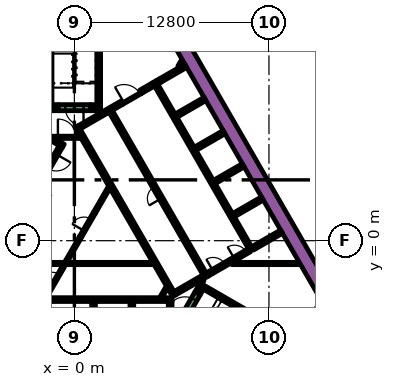
"""IFC4 building model, lengths in metres.
Left out: names, types, materials, properties, quantities, classifications, styles, units other than length and angle.
Written with IfcOpenShell. Run it as: python <this file> out.ifc"""

import sys

from ifc_helpers import new_model, si_unit, direction, frame, frame_2d, origin, origin_2d, place, context, subcontext, project, spatial, polyline, rectangle, outline, extrude, element, fill, save


model = new_model("IFC4")
c1 = context("Model", 3, precision=1e-05, world=origin(), true_north=direction((0.0, 1.0)))
c2 = subcontext(c1, "Body", "Model", "MODEL_VIEW")
j1 = project(units=[si_unit("LENGTHUNIT", "METRE"), si_unit("PLANEANGLEUNIT", "RADIAN")], contexts=[c1])
p1 = place(None, origin())
s1 = spatial("IfcSite", under=j1, at=p1, CompositionType="ELEMENT")
p2 = place(p1, origin())
s2 = spatial("IfcBuilding", under=s1, at=p2, CompositionType="ELEMENT")
p3 = place(p2, origin())
s3 = spatial("IfcBuildingStorey", under=s2, at=p3, CompositionType="ELEMENT", Elevation=0.0)
p4 = place(p3, frame((19.355, 12.329, 2.1), z_axis=(-0.200269190983, 0.336813845705, 0.920026458578), x_axis=(-0.859534207637, -0.511078218966, 0.0)))
e1 = element("IfcColumn", 1, at=p4, inside=s3, PredefinedType="COLUMN", context=c2, shape_type="SweptSolid", body=[
    extrude(rectangle(XDim=1.8, YDim=1.6, at=origin_2d()), origin(), (0.0, 0.0, 1.0), 17.608),
])
p5 = place(p2, frame((0.0, 0.0, 16.2)))
s4 = spatial("IfcBuildingStorey", under=s2, at=p5, CompositionType="ELEMENT", Elevation=16.2)
p6 = place(p5, frame((6.776, 13.364, 0.0), z_axis=(0.0, 0.0, 1.0), x_axis=(0.500004177138, -0.8660229921, 0.0)))
e2 = element("IfcWall", 2, at=p6, inside=s4, PredefinedType="SOLIDWALL", context=c2, shape_type="SweptSolid", body=[
    extrude(rectangle(XDim=20.204, YDim=0.9, at=frame_2d((10.102, 0.0))), origin(), (0.0, 0.0, 1.0), 5.4),
])
p7 = place(p5, frame((11.695, -12.644, 0.0), z_axis=(0.0, 0.0, 1.0), x_axis=(0.500010229568, 0.86601949766, 0.0)))
e3 = element("IfcWall", 3, at=p7, inside=s4, PredefinedType="SOLIDWALL", context=c2, shape_type="SweptSolid", body=[
    extrude(rectangle(XDim=9.326, YDim=0.9, at=frame_2d((4.663, 0.0))), origin(), (0.0, 0.0, 1.0), 5.4),
])
p8 = place(p5, frame((8.334, -2.964, 0.0), z_axis=(0.0, 0.0, 1.0), x_axis=(0.866016039709, -0.500016218704, 0.0)))
e4 = element("IfcWall", 4, at=p8, inside=s4, PredefinedType="SOLIDWALL", context=c2, shape_type="SweptSolid", body=[
    extrude(rectangle(XDim=7.05, YDim=0.25, at=frame_2d((3.525, 0.0))), origin(), (0.0, 0.0, 1.0), 5.4),
])
p9 = place(p5, frame((8.168, -3.503, 0.0), z_axis=(0.0, 0.0, 1.0), x_axis=(0.49972245349, 0.866185586049, 0.0)))
e5 = element("IfcWall", 5, at=p9, inside=s4, PredefinedType="SOLIDWALL", context=c2, shape_type="SweptSolid", body=[
    extrude(rectangle(XDim=0.425, YDim=0.25, at=frame_2d((0.212, 0.0))), origin(), (0.0, 0.0, 1.0), 5.4),
])
p10 = place(p5, frame((1.6, 8.95, 0.0), z_axis=(0.0, 0.0, 1.0), x_axis=(0.0, 1.0, 0.0)))
e6 = element("IfcWall", 6, at=p10, inside=s4, PredefinedType="SOLIDWALL", context=c2, shape_type="SweptSolid", body=[
    extrude(rectangle(XDim=6.8, YDim=0.25, at=frame_2d((3.4, 0.0))), origin(), (0.0, 0.0, 1.0), 5.4),
])
p11 = place(p5, frame((1.05, 8.825, 0.0), z_axis=(0.0, 0.0, 1.0), x_axis=(1.0, 0.0, 0.0)))
e7 = element("IfcWall", 7, at=p11, inside=s4, PredefinedType="SOLIDWALL", context=c2, shape_type="SweptSolid", body=[
    extrude(rectangle(XDim=0.675, YDim=0.25, at=frame_2d((0.337, 0.0))), origin(), (0.0, 0.0, 1.0), 5.4),
])
p12 = place(p5, frame((-1.6, 8.7, 0.0), z_axis=(0.0, 0.0, 1.0), x_axis=(0.0, 1.0, 0.0)))
e8 = element("IfcWall", 8, at=p12, inside=s4, PredefinedType="SOLIDWALL", context=c2, shape_type="SweptSolid", body=[
    extrude(rectangle(XDim=7.05, YDim=0.25, at=frame_2d((3.525, 0.0))), origin(), (0.0, 0.0, 1.0), 5.4),
])
p13 = place(p5, frame((-1.475, 8.825, 0.0), z_axis=(0.0, 0.0, 1.0), x_axis=(1.0, 0.0, 0.0)))
e9 = element("IfcWall", 9, at=p13, inside=s4, PredefinedType="SOLIDWALL", context=c2, shape_type="SweptSolid", body=[
    extrude(rectangle(XDim=0.425, YDim=0.25, at=frame_2d((0.212, 0.0))), origin(), (0.0, 0.0, 1.0), 5.4),
])
p14 = place(p5, frame((-5.545, -3.875, 0.0), z_axis=(0.0, 0.0, 1.0), x_axis=(1.0, 0.0, 0.0)))
e10 = element("IfcWall", 10, at=p14, inside=s4, PredefinedType="SOLIDWALL", context=c2, shape_type="SweptSolid", body=[
    extrude(rectangle(XDim=11.97, YDim=0.25, at=frame_2d((5.985, 0.0))), origin(), (0.0, 0.0, 1.0), 5.4),
])
p15 = place(p5, frame((6.3, -7.27, 0.0), z_axis=(0.0, 0.0, 1.0), x_axis=(0.0, 1.0, 0.0)))
e11 = element("IfcWall", 11, at=p15, inside=s4, PredefinedType="SOLIDWALL", context=c2, shape_type="SweptSolid", body=[
    extrude(rectangle(XDim=3.27, YDim=0.25, at=frame_2d((1.635, 0.0))), origin(), (0.0, 0.0, 1.0), 5.4),
])
for number, where, z_axis, x_axis in (
    (12, (3.78, -4.0, 0.0), (0.0, 0.0, 1.0), (0.0, -1.0, 0.0)),
    (13, (1.26, -4.0, 0.0), (0.0, 0.0, 1.0), (0.0, -1.0, 0.0)),
):
    element("IfcWall", number, at=place(p5, frame(where, z_axis=z_axis, x_axis=x_axis)), inside=s4, PredefinedType="SOLIDWALL", context=c2, shape_type="SweptSolid", body=[
        extrude(rectangle(XDim=2.2, YDim=0.25, at=frame_2d((1.1, 0.0))), origin(), (0.0, 0.0, 1.0), 5.4),
    ])
p16 = place(p5, origin())
e14 = element("IfcWall", 14, at=p16, inside=s4, PredefinedType="SOLIDWALL", context=c2, shape_type="SweptSolid", body=[
    extrude(outline(polyline([(6.552, -3.348), (6.677, -3.564), (6.46, -3.689), (0.448, 6.725), (0.565, 6.725), (0.566, 6.725), (0.566, 6.725), (0.566, 6.875), (0.566, 6.875), (0.565, 6.875), (0.361, 6.875), (0.035, 7.439), (0.252, 7.564), (0.377, 7.348), (6.552, -3.348)])), origin(), (0.0, 0.0, 1.0), 5.4),
])
p17 = place(p5, frame((11.553, -0.46, 0.0), z_axis=(0.0, 0.0, 1.0), x_axis=(-0.500004791531, 0.866022637375, 0.0)))
e15 = element("IfcWall", 15, at=p17, inside=s4, PredefinedType="SOLIDWALL", context=c2, shape_type="SweptSolid", body=[
    extrude(rectangle(XDim=12.6, YDim=0.25, at=frame_2d((6.3, 0.0))), origin(), (0.0, 0.0, 1.0), 5.4),
])
p18 = place(p5, frame((4.358, 9.791, 0.0), z_axis=(0.0, 0.0, 1.0), x_axis=(0.866100000774, 0.49987077196, 0.0)))
e16 = element("IfcWall", 16, at=p18, inside=s4, PredefinedType="SOLIDWALL", context=c2, shape_type="SweptSolid", body=[
    extrude(rectangle(XDim=0.95, YDim=0.25, at=frame_2d((0.475, 0.0))), origin(), (0.0, 0.0, 1.0), 5.4),
])
p19 = place(p5, frame((0.314, 7.456, 0.0), z_axis=(0.0, 0.0, 1.0), x_axis=(0.866013897511, 0.50001992892, 0.0)))
e17 = element("IfcWall", 17, at=p19, inside=s4, PredefinedType="SOLIDWALL", context=c2, shape_type="SweptSolid", body=[
    extrude(rectangle(XDim=3.268, YDim=0.25, at=frame_2d((1.634, 0.0))), origin(), (0.0, 0.0, 1.0), 5.4),
])
p20 = place(p5, frame((5.469, 10.577, 0.0), z_axis=(0.0, 0.0, 1.0), x_axis=(0.499919672301, -0.866071776036, 0.0)))
e18 = element("IfcWall", 18, at=p20, inside=s4, PredefinedType="SOLIDWALL", context=c2, shape_type="SweptSolid", body=[
    extrude(rectangle(XDim=0.25, YDim=0.25, at=frame_2d((0.125, 0.0))), origin(), (0.0, 0.0, 1.0), 5.4),
])
p21 = place(p5, frame((5.64, 10.531, 0.0), z_axis=(0.0, 0.0, 1.0), x_axis=(0.866000020948, 0.500043961785, 0.0)))
e19 = element("IfcWall", 19, at=p21, inside=s4, PredefinedType="SOLIDWALL", context=c2, shape_type="SweptSolid", body=[
    extrude(rectangle(XDim=1.95, YDim=0.25, at=frame_2d((0.975, 0.0))), origin(), (0.0, 0.0, 1.0), 5.4),
])
for number, where, z_axis, x_axis in (
    (20, (8.589, 9.323, 0.0), (0.0, 0.0, 1.0), (-0.866, -0.5, 0.0)),
    (21, (7.944, 6.041, 0.0), (0.0, 0.0, 1.0), (0.866, 0.5, 0.0)),
    (22, (9.204, 3.859, 0.0), (0.0, 0.0, 1.0), (0.866, 0.5, 0.0)),
    (23, (10.464, 1.677, 0.0), (0.0, 0.0, 1.0), (0.866, 0.5, 0.0)),
    (24, (11.724, -0.506, 0.0), (0.0, 0.0, 1.0), (0.866, 0.5, 0.0)),
):
    element("IfcWall", number, at=place(p5, frame(where, z_axis=z_axis, x_axis=x_axis)), inside=s4, PredefinedType="SOLIDWALL", context=c2, shape_type="SweptSolid", body=[
        extrude(rectangle(XDim=2.2, YDim=0.25, at=frame_2d((1.1, 0.0))), origin(), (0.0, 0.0, 1.0), 5.4),
    ])
p22 = place(p5, frame((6.614, -3.456, 0.0), z_axis=(0.0, 0.0, 1.0), x_axis=(0.866031582473, 0.499989298045, 0.0)))
e25 = element("IfcWall", 25, at=p22, inside=s4, PredefinedType="SOLIDWALL", context=c2, shape_type="SweptSolid", body=[
    extrude(rectangle(XDim=2.455, YDim=0.25, at=frame_2d((1.228, 0.0))), origin(), (0.0, 0.0, 1.0), 5.4),
])
p23 = place(p5, frame((-0.728, 6.24, 0.0), z_axis=(0.0, 0.0, 1.0), x_axis=(-0.865955664968, 0.500120771724, 0.0)))
e26 = element("IfcWall", 26, at=p23, inside=s4, PredefinedType="SOLIDWALL", context=c2, shape_type="SweptSolid", body=[
    extrude(rectangle(XDim=0.778, YDim=0.25, at=frame_2d((0.389, 0.0))), origin(), (0.0, 0.0, 1.0), 5.4),
])
p24 = place(p5, frame((-2.196, 8.625, 0.0), z_axis=(0.0, 0.0, 1.0), x_axis=(1.0, 0.0, 0.0)))
e27 = element("IfcWall", 27, at=p24, inside=s4, PredefinedType="PARTITIONING", context=c2, shape_type="SweptSolid", body=[
    extrude(rectangle(XDim=1.146, YDim=0.15, at=frame_2d((0.573, 0.0))), origin(), (0.0, 0.0, 1.0), 4.1),
])
p25 = place(p5, frame((5.705, -3.718, 0.0), z_axis=(0.0, 0.0, 1.0), x_axis=(0.499962090823, 0.866047289552, 0.0)))
e28 = element("IfcWall", 28, at=p25, inside=s4, PredefinedType="PARTITIONING", context=c2, shape_type="SweptSolid", body=[
    extrude(rectangle(XDim=0.735, YDim=0.15, at=frame_2d((0.367, 0.0))), origin(), (0.0, 0.0, 1.0), 4.1),
])
p26 = place(p5, frame((8.459, -2.599, 0.0), z_axis=(0.0, 0.0, 1.0), x_axis=(-0.500041054325, -0.866001699761, 0.0)))
e29 = element("IfcWall", 29, at=p26, inside=s4, PredefinedType="PARTITIONING", context=c2, shape_type="SweptSolid", body=[
    extrude(rectangle(XDim=0.929, YDim=0.15, at=frame_2d((0.464, 0.0))), origin(), (0.0, 0.0, 1.0), 5.4),
])
p27 = place(p5, frame((10.362, -1.5, 0.0), z_axis=(0.0, 0.0, 1.0), x_axis=(1.0, 0.0, 0.0)))
e30 = element("IfcWall", 30, at=p27, inside=s4, PredefinedType="PARTITIONING", context=c2, shape_type="SweptSolid", body=[
    extrude(rectangle(XDim=4.439, YDim=0.15, at=frame_2d((2.22, 0.0))), origin(), (0.0, 0.0, 1.0), 4.1),
])
p28 = place(p5, frame((-4.2, -1.5, 0.0), z_axis=(0.0, 0.0, 1.0), x_axis=(1.0, 0.0, 0.0)))
e31 = element("IfcWall", 31, at=p28, inside=s4, PredefinedType="PARTITIONING", context=c2, shape_type="SweptSolid", body=[
    extrude(rectangle(XDim=9.359, YDim=0.15, at=frame_2d((4.68, 0.0))), origin(), (0.0, 0.0, 1.0), 4.1),
])
p29 = place(p5, frame((-0.544, -1.393, 0.0), z_axis=(0.0, 0.0, 1.0), x_axis=(0.499928740635, 0.866066541489, 0.0)))
e32 = element("IfcWall", 32, at=p29, inside=s4, PredefinedType="PARTITIONING", context=c2, shape_type="SweptSolid", body=[
    extrude(rectangle(XDim=1.912, YDim=0.15, at=frame_2d((0.956, 0.0))), origin(), (0.0, 0.0, 1.0), 4.1),
])
p30 = place(p5, frame((1.312, 1.822, 0.0), z_axis=(0.0, 0.0, 1.0), x_axis=(0.500003549559, 0.866023354436, 0.0)))
e33 = element("IfcWall", 33, at=p30, inside=s4, PredefinedType="PARTITIONING", context=c2, shape_type="SweptSolid", body=[
    extrude(rectangle(XDim=1.93, YDim=0.15, at=frame_2d((0.965, 0.0))), origin(), (0.0, 0.0, 1.0), 4.1),
])
p31 = place(p5, frame((1.05, 8.625, 0.0), z_axis=(0.0, 0.0, 1.0), x_axis=(1.0, 0.0, 0.0)))
e34 = element("IfcWall", 34, at=p31, inside=s4, PredefinedType="PARTITIONING", context=c2, shape_type="SweptSolid", body=[
    extrude(rectangle(XDim=0.514, YDim=0.15, at=frame_2d((0.257, 0.0))), origin(), (0.0, 0.0, 1.0), 4.1),
])
p32 = place(p5, frame((6.872, 11.45, 0.0), z_axis=(0.0, 0.0, 1.0), x_axis=(0.499846793097, 0.866113839764, 0.0)))
e35 = element("IfcWall", 35, at=p32, inside=s4, PredefinedType="PARTITIONING", context=c2, shape_type="SweptSolid", body=[
    extrude(rectangle(XDim=0.453, YDim=0.15, at=frame_2d((0.227, 0.0))), origin(), (0.0, 0.0, 1.0), 4.1),
])
p33 = place(p5, frame((7.131, 11.6, 0.0), z_axis=(0.0, 0.0, 1.0), x_axis=(0.498600033135, 0.866832167699, 0.0)))
e36 = element("IfcWall", 36, at=p33, inside=s4, PredefinedType="PARTITIONING", context=c2, shape_type="SweptSolid", body=[
    extrude(rectangle(XDim=0.107, YDim=0.15, at=frame_2d((0.053, 0.0))), origin(), (0.0, 0.0, 1.0), 4.1),
])
p34 = place(p5, frame((8.565, -2.185, 0.0), z_axis=(0.0, 0.0, 1.0), x_axis=(-0.499997954832, 0.866026584559, 0.0)))
e37 = element("IfcWall", 37, at=p34, inside=s4, PredefinedType="SOLIDWALL", context=c2, shape_type="SweptSolid", body=[
    extrude(rectangle(XDim=12.35, YDim=0.25, at=frame_2d((6.175, 0.0))), origin(), (0.0, 0.0, 1.0), 5.4),
])
p35 = place(p34, frame((5.725, 0.0, 0.0)))
e38 = element("IfcOpeningElement", 38, at=p35, cuts=e37, PredefinedType="OPENING", context=c2, shape_type="SweptSolid", body=[
    extrude(rectangle(XDim=0.9, YDim=2.1, at=frame_2d((0.45, 1.05))), frame((0.0, 0.135, 0.0), z_axis=(0.0, -1.0, 0.0), x_axis=(1.0, 0.0, 0.0)), (0.0, 0.0, 1.0), 0.27),
])
p36 = place(p5, frame((-0.898, 6.194, 0.0), z_axis=(0.0, 0.0, 1.0), x_axis=(-0.499996202215, -0.866027596426, 0.0)))
e39 = element("IfcWall", 39, at=p36, inside=s4, PredefinedType="SOLIDWALL", context=c2, shape_type="SweptSolid", body=[
    extrude(rectangle(XDim=9.83, YDim=0.25, at=frame_2d((4.915, 0.0))), origin(), (0.0, 0.0, 1.0), 5.4),
])
p37 = place(p36, frame((0.585, 0.0, 0.0)))
e40 = element("IfcOpeningElement", 40, at=p37, cuts=e39, PredefinedType="OPENING", context=c2, shape_type="SweptSolid", body=[
    extrude(rectangle(XDim=1.1, YDim=2.1, at=frame_2d((0.55, 1.05))), frame((0.0, 0.135, 0.0), z_axis=(0.0, -1.0, 0.0), x_axis=(1.0, 0.0, 0.0)), (0.0, 0.0, 1.0), 0.27),
])
p38 = place(p36, frame((3.105, 0.0, 0.0)))
e41 = element("IfcOpeningElement", 41, at=p38, cuts=e39, PredefinedType="OPENING", context=c2, shape_type="SweptSolid", body=[
    extrude(rectangle(XDim=1.1, YDim=2.1, at=frame_2d((0.55, 1.05))), frame((0.0, 0.135, 0.0), z_axis=(0.0, -1.0, 0.0), x_axis=(1.0, 0.0, 0.0)), (0.0, 0.0, 1.0), 0.27),
])
p39 = place(p36, frame((5.625, 0.0, 0.0)))
e42 = element("IfcOpeningElement", 42, at=p39, cuts=e39, PredefinedType="OPENING", context=c2, shape_type="SweptSolid", body=[
    extrude(rectangle(XDim=1.1, YDim=2.1, at=frame_2d((0.55, 1.05))), frame((0.0, 0.135, 0.0), z_axis=(0.0, -1.0, 0.0), x_axis=(1.0, 0.0, 0.0)), (0.0, 0.0, 1.0), 0.27),
])
p40 = place(p36, frame((8.145, 0.0, 0.0)))
e43 = element("IfcOpeningElement", 43, at=p40, cuts=e39, PredefinedType="OPENING", context=c2, shape_type="SweptSolid", body=[
    extrude(rectangle(XDim=1.1, YDim=2.1, at=frame_2d((0.55, 1.05))), frame((0.0, 0.135, 0.0), z_axis=(0.0, -1.0, 0.0), x_axis=(1.0, 0.0, 0.0)), (0.0, 0.0, 1.0), 0.27),
])
p41 = place(p5, frame((7.053, -5.284, 0.0), z_axis=(0.0, 0.0, 1.0), x_axis=(0.500078061341, 0.865980330357, 0.0)))
e44 = element("IfcWall", 44, at=p41, inside=s4, PredefinedType="SOLIDWALL", context=c2, shape_type="SweptSolid", body=[
    extrude(rectangle(XDim=2.1, YDim=0.4, at=frame_2d((1.05, 0.0))), origin(), (0.0, 0.0, 1.0), 5.4),
])
p42 = place(p41, frame((0.45, 0.0, 0.0)))
e45 = element("IfcOpeningElement", 45, at=p42, cuts=e44, PredefinedType="OPENING", context=c2, shape_type="SweptSolid", body=[
    extrude(rectangle(XDim=1.2, YDim=2.1, at=frame_2d((0.6, 1.05))), frame((0.0, 0.21, 0.0), z_axis=(0.0, -1.0, 0.0), x_axis=(1.0, 0.0, 0.0)), (0.0, 0.0, 1.0), 0.42),
])
p43 = place(p5, frame((8.74, -2.229, 0.0), z_axis=(0.0, 0.0, 1.0), x_axis=(0.865989075817, 0.500062916607, 0.0)))
e46 = element("IfcWall", 46, at=p43, inside=s4, PredefinedType="SOLIDWALL", context=c2, shape_type="SweptSolid", body=[
    extrude(rectangle(XDim=1.8, YDim=0.25, at=frame_2d((0.9, 0.0))), origin(), (0.0, 0.0, 1.0), 5.4),
])
p44 = place(p43, frame((0.45, 0.0, 0.0)))
e47 = element("IfcOpeningElement", 47, at=p44, cuts=e46, PredefinedType="OPENING", context=c2, shape_type="SweptSolid", body=[
    extrude(rectangle(XDim=0.9, YDim=2.1, at=frame_2d((0.45, 1.05))), frame((0.0, 0.135, 0.0), z_axis=(0.0, -1.0, 0.0), x_axis=(1.0, 0.0, 0.0)), (0.0, 0.0, 1.0), 0.27),
])
p45 = place(p5, frame((1.05, 8.75, 0.0), z_axis=(0.0, 0.0, 1.0), x_axis=(-1.0, 0.0, 0.0)))
e48 = element("IfcWall", 48, at=p45, inside=s4, PredefinedType="SOLIDWALL", context=c2, shape_type="SweptSolid", body=[
    extrude(rectangle(XDim=2.1, YDim=0.4, at=frame_2d((1.05, 0.0))), origin(), (0.0, 0.0, 1.0), 5.4),
])
p46 = place(p45, frame((0.45, 0.0, 0.0)))
e49 = element("IfcOpeningElement", 49, at=p46, cuts=e48, PredefinedType="OPENING", context=c2, shape_type="SweptSolid", body=[
    extrude(rectangle(XDim=1.2, YDim=2.1, at=frame_2d((0.6, 1.05))), frame((0.0, 0.21, 0.0), z_axis=(0.0, -1.0, 0.0), x_axis=(1.0, 0.0, 0.0)), (0.0, 0.0, 1.0), 0.42),
])
p47 = place(p5, frame((-1.76, -3.498, 0.0), z_axis=(0.0, 0.0, 1.0), x_axis=(0.499977374825, 0.866038466041, 0.0)))
e50 = element("IfcWall", 50, at=p47, inside=s4, PredefinedType="PARTITIONING", context=c2, shape_type="SweptSolid", body=[
    extrude(rectangle(XDim=2.1, YDim=0.15, at=frame_2d((1.05, 0.0))), origin(), (0.0, 0.0, 1.0), 4.1),
])
p48 = place(p47, frame((0.6, 0.0, 0.0)))
e51 = element("IfcOpeningElement", 51, at=p48, cuts=e50, PredefinedType="OPENING", context=c2, shape_type="SweptSolid", body=[
    extrude(rectangle(XDim=0.9, YDim=2.1, at=frame_2d((0.45, 1.05))), frame((0.0, 0.085, 0.0), z_axis=(0.0, -1.0, 0.0), x_axis=(1.0, 0.0, 0.0)), (0.0, 0.0, 1.0), 0.17),
])
p49 = place(p5, frame((-1.534, 6.8, 0.0), z_axis=(0.0, 0.0, 1.0), x_axis=(1.0, 0.0, 0.0)))
e52 = element("IfcWall", 52, at=p49, inside=s4, PredefinedType="PARTITIONING", context=c2, shape_type="SweptSolid", body=[
    extrude(rectangle(XDim=2.1, YDim=0.15, at=frame_2d((1.05, 0.0))), origin(), (0.0, 0.0, 1.0), 4.1),
])
p50 = place(p49, frame((0.45, 0.0, 0.0)))
e53 = element("IfcOpeningElement", 53, at=p50, cuts=e52, PredefinedType="OPENING", context=c2, shape_type="SweptSolid", body=[
    extrude(rectangle(XDim=1.2, YDim=2.1, at=frame_2d((0.6, 1.05))), frame((0.0, 0.085, 0.0), z_axis=(0.0, -1.0, 0.0), x_axis=(1.0, 0.0, 0.0)), (0.0, 0.0, 1.0), 0.17),
])
p51 = place(p5, frame((3.183, 9.02, 0.0), z_axis=(0.0, 0.0, 1.0), x_axis=(0.866034573852, 0.49998411664, 0.0)))
e54 = element("IfcWall", 54, at=p51, inside=s4, PredefinedType="PARTITIONING", context=c2, shape_type="SweptSolid", body=[
    extrude(rectangle(XDim=1.4, YDim=0.09, at=frame_2d((0.7, 0.0))), origin(), (0.0, 0.0, 1.0), 4.1),
])
p52 = place(p51, frame((0.1, 0.0, 0.0)))
e55 = element("IfcOpeningElement", 55, at=p52, cuts=e54, PredefinedType="OPENING", context=c2, shape_type="SweptSolid", body=[
    extrude(rectangle(XDim=1.2, YDim=2.1, at=frame_2d((0.6, 1.05))), frame((0.0, 0.055, 0.0), z_axis=(0.0, -1.0, 0.0), x_axis=(1.0, 0.0, 0.0)), (0.0, 0.0, 1.0), 0.11),
])
p53 = place(p5, frame((0.412, 0.263, 0.0), z_axis=(0.0, 0.0, 1.0), x_axis=(0.500062916607, 0.865989075817, 0.0)))
e56 = element("IfcWall", 56, at=p53, inside=s4, PredefinedType="PARTITIONING", context=c2, shape_type="SweptSolid", body=[
    extrude(rectangle(XDim=1.8, YDim=0.15, at=frame_2d((0.9, 0.0))), origin(), (0.0, 0.0, 1.0), 4.1),
])
p54 = place(p53, frame((0.45, 0.0, 0.0)))
e57 = element("IfcOpeningElement", 57, at=p54, cuts=e56, PredefinedType="OPENING", context=c2, shape_type="SweptSolid", body=[
    extrude(rectangle(XDim=0.9, YDim=2.1, at=frame_2d((0.45, 1.05))), frame((0.0, 0.085, 0.0), z_axis=(0.0, -1.0, 0.0), x_axis=(1.0, 0.0, 0.0)), (0.0, 0.0, 1.0), 0.17),
])
p55 = place(p5, frame((10.313, -1.32, 0.0), z_axis=(0.0, 0.0, 1.0), x_axis=(0.866034573852, 0.49998411664, 0.0)))
e58 = element("IfcWall", 58, at=p55, inside=s4, PredefinedType="SOLIDWALL", context=c2, shape_type="SweptSolid", body=[
    extrude(rectangle(XDim=1.4, YDim=0.25, at=frame_2d((0.7, 0.0))), origin(), (0.0, 0.0, 1.0), 5.4),
])
p56 = place(p55, frame((0.25, 0.0, 0.0)))
e59 = element("IfcOpeningElement", 59, at=p56, cuts=e58, PredefinedType="OPENING", context=c2, shape_type="SweptSolid", body=[
    extrude(rectangle(XDim=0.9, YDim=2.1, at=frame_2d((0.45, 1.05))), frame((0.0, 0.135, 0.0), z_axis=(0.0, -1.0, 0.0), x_axis=(1.0, 0.0, 0.0)), (0.0, 0.0, 1.0), 0.27),
])
p57 = place(p5, frame((38.25, -14.145, 0.0), z_axis=(0.0, 0.0, 1.0), x_axis=(-0.500000527961, 0.866025098966, 0.0)))
e60 = element("IfcWall", 60, at=p57, inside=s4, PredefinedType="SOLIDWALL", context=c2, shape_type="SweptSolid", body=[
    extrude(rectangle(XDim=62.75, YDim=0.25, at=frame_2d((31.375, 0.0))), origin(), (0.0, 0.0, 1.0), 5.0),
])
p58 = place(p35, origin())
e61 = element("IfcDoor", 61, at=p58, inside=s4, OperationType="SINGLE_SWING_LEFT", PredefinedType="DOOR", context=c2, shape_type="SweptSolid", body=[
    extrude(rectangle(XDim=0.9, YDim=2.1, at=frame_2d((0.45, 1.05))), frame((0.0, 0.025, 0.0), z_axis=(0.0, -1.0, 0.0), x_axis=(1.0, 0.0, 0.0)), (0.0, 0.0, 1.0), 0.05),
])
fill(e38, e61)
p59 = place(p37, origin())
e62 = element("IfcDoor", 62, at=p59, inside=s4, OperationType="DOUBLE_DOOR_SLIDING", PredefinedType="DOOR", context=c2, shape_type="SweptSolid", body=[
    extrude(rectangle(XDim=1.1, YDim=2.1, at=frame_2d((0.55, 1.05))), frame((0.0, 0.025, 0.0), z_axis=(0.0, -1.0, 0.0), x_axis=(1.0, 0.0, 0.0)), (0.0, 0.0, 1.0), 0.05),
])
fill(e40, e62)
p60 = place(p42, origin())
e63 = element("IfcDoor", 63, at=p60, inside=s4, OperationType="SINGLE_SWING_LEFT", PredefinedType="DOOR", context=c2, shape_type="SweptSolid", body=[
    extrude(rectangle(XDim=1.2, YDim=2.1, at=frame_2d((0.6, 1.05))), frame((0.0, 0.025, 0.0), z_axis=(0.0, -1.0, 0.0), x_axis=(1.0, 0.0, 0.0)), (0.0, 0.0, 1.0), 0.05),
])
fill(e45, e63)
p61 = place(p44, origin())
e64 = element("IfcDoor", 64, at=p61, inside=s4, OperationType="SINGLE_SWING_LEFT", PredefinedType="DOOR", context=c2, shape_type="SweptSolid", body=[
    extrude(rectangle(XDim=0.9, YDim=2.1, at=frame_2d((0.45, 1.05))), frame((0.0, 0.025, 0.0), z_axis=(0.0, -1.0, 0.0), x_axis=(1.0, 0.0, 0.0)), (0.0, 0.0, 1.0), 0.05),
])
fill(e47, e64)
p62 = place(p46, origin())
e65 = element("IfcDoor", 65, at=p62, inside=s4, OperationType="SINGLE_SWING_LEFT", PredefinedType="DOOR", context=c2, shape_type="SweptSolid", body=[
    extrude(rectangle(XDim=1.2, YDim=2.1, at=frame_2d((0.6, 1.05))), frame((0.0, 0.025, 0.0), z_axis=(0.0, -1.0, 0.0), x_axis=(1.0, 0.0, 0.0)), (0.0, 0.0, 1.0), 0.05),
])
fill(e49, e65)
p63 = place(p48, origin())
e66 = element("IfcDoor", 66, at=p63, inside=s4, OperationType="SINGLE_SWING_LEFT", PredefinedType="DOOR", context=c2, shape_type="SweptSolid", body=[
    extrude(rectangle(XDim=0.9, YDim=2.1, at=frame_2d((0.45, 1.05))), frame((0.0, 0.025, 0.0), z_axis=(0.0, -1.0, 0.0), x_axis=(1.0, 0.0, 0.0)), (0.0, 0.0, 1.0), 0.05),
])
fill(e51, e66)
p64 = place(p50, origin())
e67 = element("IfcDoor", 67, at=p64, inside=s4, OperationType="SINGLE_SWING_LEFT", PredefinedType="DOOR", context=c2, shape_type="SweptSolid", body=[
    extrude(rectangle(XDim=1.2, YDim=2.1, at=frame_2d((0.6, 1.05))), frame((0.0, 0.025, 0.0), z_axis=(0.0, -1.0, 0.0), x_axis=(1.0, 0.0, 0.0)), (0.0, 0.0, 1.0), 0.05),
])
fill(e53, e67)
p65 = place(p52, origin())
e68 = element("IfcDoor", 68, at=p65, inside=s4, OperationType="SINGLE_SWING_LEFT", PredefinedType="DOOR", context=c2, shape_type="SweptSolid", body=[
    extrude(rectangle(XDim=1.2, YDim=2.1, at=frame_2d((0.6, 1.05))), frame((0.0, 0.025, 0.0), z_axis=(0.0, -1.0, 0.0), x_axis=(1.0, 0.0, 0.0)), (0.0, 0.0, 1.0), 0.05),
])
fill(e55, e68)
p66 = place(p54, origin())
e69 = element("IfcDoor", 69, at=p66, inside=s4, OperationType="SINGLE_SWING_LEFT", PredefinedType="DOOR", context=c2, shape_type="SweptSolid", body=[
    extrude(rectangle(XDim=0.9, YDim=2.1, at=frame_2d((0.45, 1.05))), frame((0.0, 0.025, 0.0), z_axis=(0.0, -1.0, 0.0), x_axis=(1.0, 0.0, 0.0)), (0.0, 0.0, 1.0), 0.05),
])
fill(e57, e69)
p67 = place(p56, origin())
e70 = element("IfcDoor", 70, at=p67, inside=s4, OperationType="SINGLE_SWING_LEFT", PredefinedType="DOOR", context=c2, shape_type="SweptSolid", body=[
    extrude(rectangle(XDim=0.9, YDim=2.1, at=frame_2d((0.45, 1.05))), frame((0.0, 0.025, 0.0), z_axis=(0.0, -1.0, 0.0), x_axis=(1.0, 0.0, 0.0)), (0.0, 0.0, 1.0), 0.05),
])
fill(e59, e70)
save(model, sys.argv[1])
